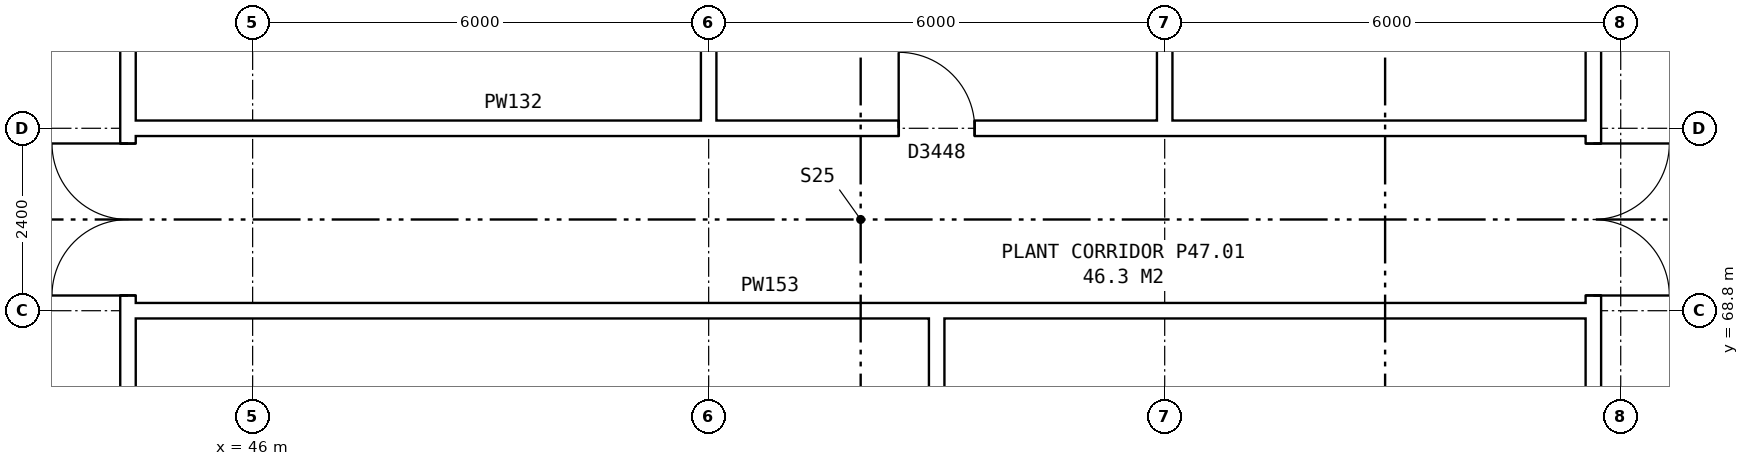
"""IFC4 building model, lengths in metres.
Left out: names, types, materials, properties, quantities, classifications, styles, units other than length and angle.
Written with IfcOpenShell. Run it as: python <this file> out.ifc"""

import sys

from ifc_helpers import new_model, si_unit, direction, frame, frame_2d, origin, place, context, subcontext, project, spatial, rectangle, extrude, element, fill, save


model = new_model("IFC4")
c1 = context("Model", 3, precision=1e-05, world=origin(), true_north=direction((0.0, 1.0)))
c2 = subcontext(c1, "Body", "Model", "MODEL_VIEW")
j1 = project(units=[si_unit("LENGTHUNIT", "METRE"), si_unit("PLANEANGLEUNIT", "RADIAN")], contexts=[c1])
p1 = place(None, origin())
s1 = spatial("IfcSite", under=j1, at=p1, CompositionType="ELEMENT")
p2 = place(p1, origin())
s2 = spatial("IfcBuilding", under=s1, at=p2, CompositionType="ELEMENT")
p3 = place(p2, frame((0.0, 0.0, 167.1)))
s3 = spatial("IfcBuildingStorey", under=s2, at=p3, CompositionType="ELEMENT", Elevation=167.1)
p4 = place(p3, frame((63.64, 63.9, 0.0), z_axis=(0.0, 0.0, 1.0), x_axis=(0.0, 1.0, 0.0)))
e1 = element("IfcWall", 1, at=p4, inside=s3, PredefinedType="PARTITIONING", context=c2, shape_type="SweptSolid", body=[
    extrude(rectangle(XDim=12.2, YDim=0.2, at=frame_2d((6.1, 0.0))), origin(), (0.0, 0.0, 1.0), 4.2),
])
p5 = place(p4, frame((5.1, 0.0, 0.0)))
e2 = element("IfcOpeningElement", 2, at=p5, cuts=e1, PredefinedType="OPENING", context=c2, shape_type="SweptSolid", body=[
    extrude(rectangle(XDim=2.0, YDim=2.1, at=frame_2d((1.0, 1.05))), frame((0.0, 0.11, 0.0), z_axis=(0.0, -1.0, 0.0), x_axis=(1.0, 0.0, 0.0)), (0.0, 0.0, 1.0), 0.22),
])
p6 = place(p3, frame((44.36, 63.9, 0.0), z_axis=(0.0, 0.0, 1.0), x_axis=(0.0, 1.0, 0.0)))
e3 = element("IfcWall", 3, at=p6, inside=s3, PredefinedType="PARTITIONING", context=c2, shape_type="SweptSolid", body=[
    extrude(rectangle(XDim=12.2, YDim=0.2, at=frame_2d((6.1, 0.0))), origin(), (0.0, 0.0, 1.0), 4.2),
])
p7 = place(p6, frame((5.1, 0.0, 0.0)))
e4 = element("IfcOpeningElement", 4, at=p7, cuts=e3, PredefinedType="OPENING", context=c2, shape_type="SweptSolid", body=[
    extrude(rectangle(XDim=2.0, YDim=2.1, at=frame_2d((1.0, 1.05))), frame((0.0, 0.11, 0.0), z_axis=(0.0, -1.0, 0.0), x_axis=(1.0, 0.0, 0.0)), (0.0, 0.0, 1.0), 0.22),
])
p8 = place(p3, frame((44.36, 68.8, 0.0), z_axis=(0.0, 0.0, 1.0), x_axis=(1.0, 0.0, 0.0)))
e5 = element("IfcWall", 5, at=p8, inside=s3, PredefinedType="PARTITIONING", context=c2, shape_type="SweptSolid", body=[
    extrude(rectangle(XDim=19.28, YDim=0.2, at=frame_2d((9.64, 0.0))), origin(), (0.0, 0.0, 1.0), 4.2),
])
p9 = place(p3, frame((44.36, 71.2, 0.0), z_axis=(0.0, 0.0, 1.0), x_axis=(1.0, 0.0, 0.0)))
e6 = element("IfcWall", 6, at=p9, inside=s3, PredefinedType="PARTITIONING", context=c2, shape_type="SweptSolid", body=[
    extrude(rectangle(XDim=19.28, YDim=0.2, at=frame_2d((9.64, 0.0))), origin(), (0.0, 0.0, 1.0), 4.2),
])
p10 = place(p9, frame((10.14, 0.0, 0.0)))
e7 = element("IfcOpeningElement", 7, at=p10, cuts=e6, PredefinedType="OPENING", context=c2, shape_type="SweptSolid", body=[
    extrude(rectangle(XDim=1.0, YDim=2.1, at=frame_2d((0.5, 1.05))), frame((0.0, 0.11, 0.0), z_axis=(0.0, -1.0, 0.0), x_axis=(1.0, 0.0, 0.0)), (0.0, 0.0, 1.0), 0.22),
])
for number, where, z_axis, x_axis in (
    (8, (52.0, 71.1, 0.0), (0.0, 0.0, 1.0), (0.0, 1.0, 0.0)),
    (9, (55.0, 54.24, 0.0), (0.0, 0.0, 1.0), (0.0, 1.0, 0.0)),
    (10, (58.0, 71.1, 0.0), (0.0, 0.0, 1.0), (0.0, 1.0, 0.0)),
):
    element("IfcWall", number, at=place(p3, frame(where, z_axis=z_axis, x_axis=x_axis)), inside=s3, PredefinedType="PARTITIONING", context=c2, shape_type="SweptSolid", body=[
        extrude(rectangle(XDim=14.66, YDim=0.2, at=frame_2d((7.33, 0.0))), origin(), (0.0, 0.0, 1.0), 4.2),
    ])
p11 = place(p5, frame((2.0, 0.0, 0.0), z_axis=(0.0, 0.0, 1.0), x_axis=(-1.0, 0.0, 0.0)))
e11 = element("IfcDoor", 11, at=p11, inside=s3, OperationType="DOUBLE_DOOR_SINGLE_SWING", PredefinedType="DOOR", context=c2, shape_type="SweptSolid", body=[
    extrude(rectangle(XDim=2.0, YDim=2.1, at=frame_2d((1.0, 1.05))), frame((0.0, 0.025, 0.0), z_axis=(0.0, -1.0, 0.0), x_axis=(1.0, 0.0, 0.0)), (0.0, 0.0, 1.0), 0.05),
])
fill(e2, e11)
p12 = place(p7, origin())
e12 = element("IfcDoor", 12, at=p12, inside=s3, OperationType="DOUBLE_DOOR_SINGLE_SWING", PredefinedType="DOOR", context=c2, shape_type="SweptSolid", body=[
    extrude(rectangle(XDim=2.0, YDim=2.1, at=frame_2d((1.0, 1.05))), frame((0.0, 0.025, 0.0), z_axis=(0.0, -1.0, 0.0), x_axis=(1.0, 0.0, 0.0)), (0.0, 0.0, 1.0), 0.05),
])
fill(e4, e12)
p13 = place(p10, origin())
e13 = element("IfcDoor", 13, at=p13, inside=s3, OperationType="SINGLE_SWING_LEFT", PredefinedType="DOOR", context=c2, shape_type="SweptSolid", body=[
    extrude(rectangle(XDim=1.0, YDim=2.1, at=frame_2d((0.5, 1.05))), frame((0.0, 0.025, 0.0), z_axis=(0.0, -1.0, 0.0), x_axis=(1.0, 0.0, 0.0)), (0.0, 0.0, 1.0), 0.05),
])
fill(e7, e13)
save(model, sys.argv[1])
